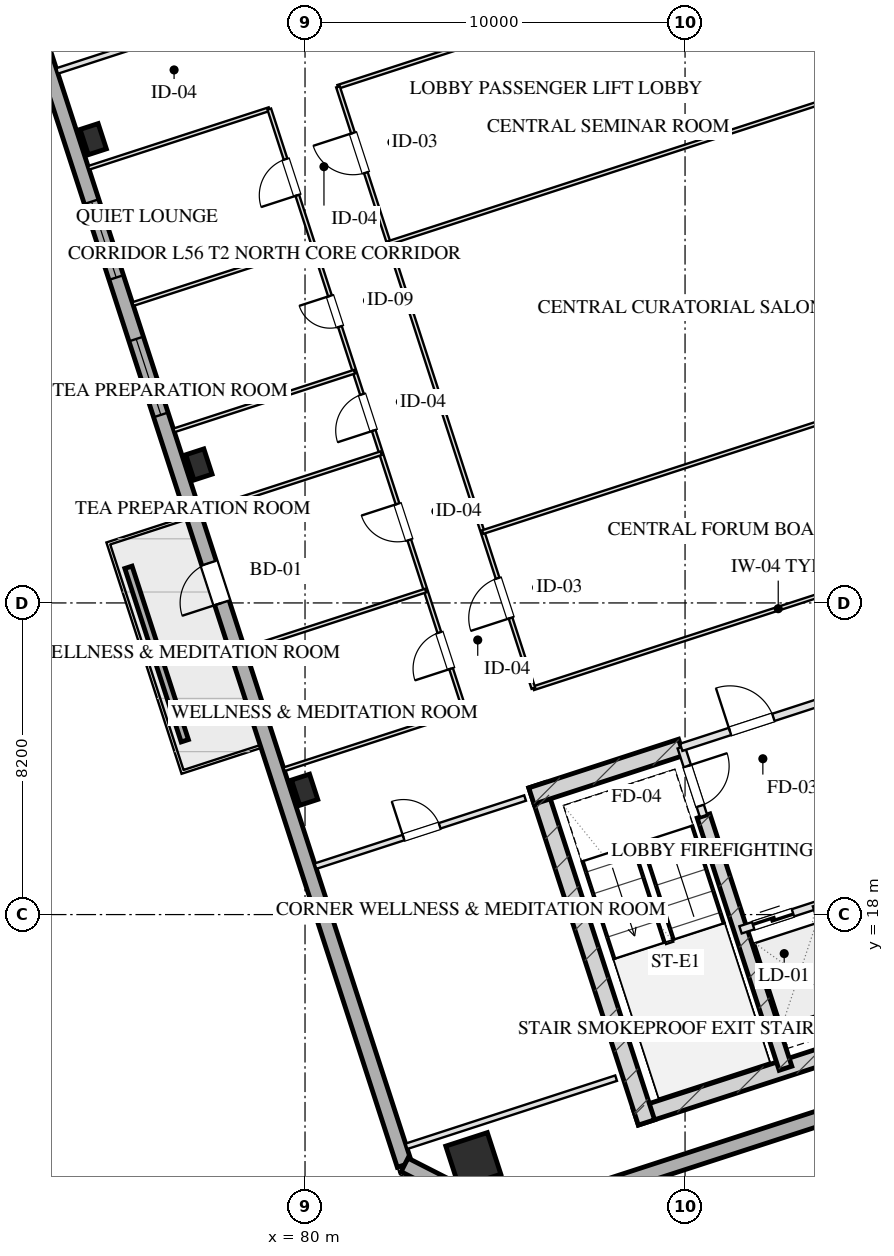
"""IFC4 building model, lengths in metres.
Left out: names, types, materials, properties, quantities, classifications, styles, units other than length and angle.
Written with IfcOpenShell. Run it as: python <this file> out.ifc"""

import sys

from ifc_helpers import new_model, si_unit, direction, frame, frame_2d, origin, origin_2d, place, context, subcontext, project, spatial, rectangle, hollow_rectangle, extrude, element, fill, save


model = new_model("IFC4")
c1 = context("Model", 3, precision=1e-05, world=origin(), true_north=direction((0.0, 1.0)))
c2 = subcontext(c1, "Body", "Model", "MODEL_VIEW")
j1 = project(units=[si_unit("LENGTHUNIT", "METRE"), si_unit("PLANEANGLEUNIT", "RADIAN")], contexts=[c1])
p1 = place(None, origin())
s1 = spatial("IfcSite", under=j1, at=p1, CompositionType="ELEMENT")
p2 = place(p1, origin())
s2 = spatial("IfcBuilding", under=s1, at=p2, CompositionType="ELEMENT")
p3 = place(p2, frame((0.0, 0.0, 209.3)))
s3 = spatial("IfcBuildingStorey", under=s2, at=p3, CompositionType="ELEMENT", Elevation=209.3)
p4 = place(p3, frame((88.701, 12.675, 0.0), z_axis=(0.0, 0.0, 1.0), x_axis=(0.95105824505, 0.309011673763, 0.0)))
e1 = element("IfcWall", 1, at=p4, inside=s3, PredefinedType="SHEAR", context=c2, shape_type="SweptSolid", body=[
    extrude(rectangle(XDim=16.25, YDim=0.45, at=frame_2d((8.125, 0.0))), origin(), (0.0, 0.0, 1.0), 3.45),
])
p5 = place(p3, frame((86.102, 21.404, 0.0), z_axis=(0.0, 0.0, 1.0), x_axis=(0.309035778627, -0.951050412717, 0.0)))
e2 = element("IfcWall", 2, at=p5, inside=s3, PredefinedType="SHEAR", context=c2, shape_type="SweptSolid", body=[
    extrude(rectangle(XDim=9.33, YDim=0.45, at=frame_2d((4.665, 0.0))), origin(), (0.0, 0.0, 1.0), 3.45),
])
p6 = place(p3, frame((90.486, 20.594, 0.0), z_axis=(0.0, 0.0, 1.0), x_axis=(0.309020428229, -0.951055400562, 0.0)))
e3 = element("IfcWall", 3, at=p6, inside=s3, PredefinedType="SHEAR", context=c2, shape_type="SweptSolid", body=[
    extrude(rectangle(XDim=6.98, YDim=0.35, at=frame_2d((3.49, 0.0))), origin(), (0.0, 0.0, 1.0), 3.45),
])
p7 = place(p3, frame((85.957, 21.12, 0.0), z_axis=(0.0, 0.0, 1.0), x_axis=(0.951064796122, 0.308991510526, 0.0)))
e4 = element("IfcWall", 4, at=p7, inside=s3, PredefinedType="SHEAR", context=c2, shape_type="SweptSolid", body=[
    extrude(rectangle(XDim=4.145, YDim=0.45, at=frame_2d((2.073, 0.0))), origin(), (0.0, 0.0, 1.0), 3.45),
])
p8 = place(p3, frame((84.428, 11.539, 0.0), z_axis=(0.0, 0.0, 1.0), x_axis=(0.951056516295, 0.309016994375, 0.0)))
e5 = element("IfcColumn", 5, at=p8, inside=s3, PredefinedType="COLUMN", context=c2, shape_type="SweptSolid", body=[
    extrude(hollow_rectangle(XDim=1.15, YDim=1.15, WallThickness=0.04, at=origin_2d()), origin(), (0.0, 0.0, 1.0), 3.451),
])
for number, where, z_axis, x_axis in (
    (6, (79.99, 21.284, 0.0), (0.0, 0.0, 1.0), (0.951, 0.309, 0.0)),
    (7, (77.208, 29.844, 0.0), (0.0, 0.0, 1.0), (0.951, 0.309, 0.0)),
    (8, (74.427, 38.403, 0.0), (0.0, 0.0, 1.0), (0.951, 0.309, 0.0)),
):
    element("IfcColumn", number, at=place(p3, frame(where, z_axis=z_axis, x_axis=x_axis)), inside=s3, PredefinedType="COLUMN", context=c2, shape_type="SweptSolid", body=[
        extrude(hollow_rectangle(XDim=0.5, YDim=0.7, WallThickness=0.025, at=origin_2d()), origin(), (0.0, 0.0, 1.0), 3.451),
    ])
p9 = place(p3, frame((82.618, 11.414, 0.0), z_axis=(0.0, 0.0, 1.0), x_axis=(-0.309016491071, 0.951056679828, 0.0)))
e9 = element("IfcWall", 9, at=p9, inside=s3, PredefinedType="SOLIDWALL", context=c2, shape_type="SweptSolid", body=[
    extrude(rectangle(XDim=38.4, YDim=0.4, at=frame_2d((19.2, 0.0))), origin(), (0.0, 0.0, 1.0), 2.61),
])
p10 = place(p9, frame((20.75, 0.0, 0.75)))
e10 = element("IfcOpeningElement", 10, at=p10, cuts=e9, PredefinedType="OPENING", context=c2, shape_type="SweptSolid", body=[
    extrude(rectangle(XDim=2.1, YDim=1.46, at=frame_2d((1.05, 0.73))), frame((0.0, 0.21, 0.0), z_axis=(0.0, -1.0, 0.0), x_axis=(1.0, 0.0, 0.0)), (0.0, 0.0, 1.0), 0.42),
])
p11 = place(p9, frame((24.55, 0.0, 0.75)))
e11 = element("IfcOpeningElement", 11, at=p11, cuts=e9, PredefinedType="OPENING", context=c2, shape_type="SweptSolid", body=[
    extrude(rectangle(XDim=2.1, YDim=1.46, at=frame_2d((1.05, 0.73))), frame((0.0, 0.21, 0.0), z_axis=(0.0, -1.0, 0.0), x_axis=(1.0, 0.0, 0.0)), (0.0, 0.0, 1.0), 0.42),
])
p12 = place(p9, frame((15.55, 0.0, 0.0)))
e12 = element("IfcOpeningElement", 12, at=p12, cuts=e9, PredefinedType="OPENING", context=c2, shape_type="SweptSolid", body=[
    extrude(rectangle(XDim=1.1, YDim=2.15, at=frame_2d((0.55, 1.075))), frame((0.0, 0.21, 0.0), z_axis=(0.0, -1.0, 0.0), x_axis=(1.0, 0.0, 0.0)), (0.0, 0.0, 1.0), 0.42),
])
p13 = place(p3, frame((107.835, 17.294, 0.0), z_axis=(0.0, 0.0, 1.0), x_axis=(-0.951058012937, -0.309012388148, 0.0)))
e13 = element("IfcWall", 13, at=p13, inside=s3, PredefinedType="SOLIDWALL", context=c2, shape_type="SweptSolid", body=[
    extrude(rectangle(XDim=23.6, YDim=0.4, at=frame_2d((11.8, 0.0))), origin(), (0.0, 0.0, 1.0), 2.61),
])
p14 = place(p3, frame((85.39, 10.001, 0.0), z_axis=(0.0, 0.0, 1.0), x_axis=(-0.890979603174, 0.454043331334, 0.0)))
e14 = element("IfcWall", 14, at=p14, inside=s3, PredefinedType="SOLIDWALL", context=c2, shape_type="SweptSolid", body=[
    extrude(rectangle(XDim=3.111, YDim=0.4, at=frame_2d((1.556, 0.0))), origin(), (0.0, 0.0, 1.0), 2.61),
])
p15 = place(p3, frame((76.837, 22.573, 0.0), z_axis=(0.0, 0.0, 1.0), x_axis=(-0.309032019345, 0.951051634255, 0.0)))
e15 = element("IfcWall", 15, at=p15, inside=s3, PredefinedType="PARAPET", context=c2, shape_type="SweptSolid", body=[
    extrude(rectangle(XDim=4.8, YDim=0.2, at=frame_2d((2.4, 0.0))), origin(), (0.0, 0.0, 1.0), 0.75),
])
p16 = place(p3, frame((89.899, 22.401, 0.0), z_axis=(0.0, 0.0, 1.0), x_axis=(0.308932062672, -0.951084108086, 0.0)))
e16 = element("IfcWall", 16, at=p16, inside=s3, PredefinedType="PARTITIONING", context=c2, shape_type="SweptSolid", body=[
    extrude(rectangle(XDim=1.9, YDim=0.2, at=frame_2d((0.95, 0.0))), origin(), (0.0, 0.0, 1.0), 3.175),
])
p17 = place(p16, frame((0.52, 0.0, 0.0)))
e17 = element("IfcOpeningElement", 17, at=p17, cuts=e16, PredefinedType="OPENING", context=c2, shape_type="SweptSolid", body=[
    extrude(rectangle(XDim=1.1, YDim=2.05, at=frame_2d((0.55, 1.025))), frame((0.0, 0.11, 0.0), z_axis=(0.0, -1.0, 0.0), x_axis=(1.0, 0.0, 0.0)), (0.0, 0.0, 1.0), 0.22),
])
p18 = place(p3, frame((89.899, 22.401, 0.0), z_axis=(0.0, 0.0, 1.0), x_axis=(0.951046716504, 0.309047153403, 0.0)))
e18 = element("IfcWall", 18, at=p18, inside=s3, PredefinedType="PARTITIONING", context=c2, shape_type="SweptSolid", body=[
    extrude(rectangle(XDim=3.83, YDim=0.2, at=frame_2d((1.915, 0.0))), origin(), (0.0, 0.0, 1.0), 3.175),
])
p19 = place(p18, frame((1.35, 0.0, 0.0)))
e19 = element("IfcOpeningElement", 19, at=p19, cuts=e18, PredefinedType="OPENING", context=c2, shape_type="SweptSolid", body=[
    extrude(rectangle(XDim=1.2, YDim=2.05, at=frame_2d((0.6, 1.025))), frame((0.0, 0.11, 0.0), z_axis=(0.0, -1.0, 0.0), x_axis=(1.0, 0.0, 0.0)), (0.0, 0.0, 1.0), 0.22),
])
p20 = place(p3, frame((91.46, 17.598, 0.0), z_axis=(0.0, 0.0, 1.0), x_axis=(0.951062257173, 0.308999325213, 0.0)))
e20 = element("IfcWall", 20, at=p20, inside=s3, PredefinedType="PARTITIONING", context=c2, shape_type="SweptSolid", body=[
    extrude(rectangle(XDim=2.1, YDim=0.2, at=frame_2d((1.05, 0.0))), origin(), (0.0, 0.0, 1.0), 3.175),
])
p21 = place(p20, frame((0.35, 0.0, 0.0)))
e21 = element("IfcOpeningElement", 21, at=p21, cuts=e20, PredefinedType="OPENING", context=c2, shape_type="SweptSolid", body=[
    extrude(rectangle(XDim=1.1, YDim=2.05, at=frame_2d((0.55, 1.025))), frame((0.0, 0.11, 0.0), z_axis=(0.0, -1.0, 0.0), x_axis=(1.0, 0.0, 0.0)), (0.0, 0.0, 1.0), 0.22),
])
p22 = place(p3, frame((93.457, 18.247, 0.0), z_axis=(0.0, 0.0, 1.0), x_axis=(0.3089935693, -0.951064127245, 0.0)))
e22 = element("IfcWall", 22, at=p22, inside=s3, PredefinedType="PARTITIONING", context=c2, shape_type="SweptSolid", body=[
    extrude(rectangle(XDim=3.7, YDim=0.2, at=frame_2d((1.85, 0.0))), origin(), (0.0, 0.0, 1.0), 3.175),
])
p23 = place(p3, frame((82.669, 11.903, 0.0), z_axis=(0.0, 0.0, 1.0), x_axis=(0.951059431056, 0.309008023519, 0.0)))
e23 = element("IfcWall", 23, at=p23, inside=s3, PredefinedType="PARTITIONING", context=c2, shape_type="SweptSolid", body=[
    extrude(rectangle(XDim=5.8, YDim=0.15, at=frame_2d((2.9, 0.0))), origin(), (0.0, 0.0, 1.0), 3.175),
])
p24 = place(p3, frame((80.275, 19.274, 0.0), z_axis=(0.0, 0.0, 1.0), x_axis=(0.951059431056, 0.309008023519, 0.0)))
e24 = element("IfcWall", 24, at=p24, inside=s3, PredefinedType="PARTITIONING", context=c2, shape_type="SweptSolid", body=[
    extrude(rectangle(XDim=5.8, YDim=0.15, at=frame_2d((2.9, 0.0))), origin(), (0.0, 0.0, 1.0), 3.175),
])
p25 = place(p24, frame((2.436, 0.0, 0.0)))
e25 = element("IfcOpeningElement", 25, at=p25, cuts=e24, PredefinedType="OPENING", context=c2, shape_type="SweptSolid", body=[
    extrude(rectangle(XDim=1.0, YDim=2.05, at=frame_2d((0.5, 1.025))), frame((0.0, 0.085, 0.0), z_axis=(0.0, -1.0, 0.0), x_axis=(1.0, 0.0, 0.0)), (0.0, 0.0, 1.0), 0.17),
])
p26 = place(p3, frame((73.476, 40.197, 0.0), z_axis=(0.0, 0.0, 1.0), x_axis=(0.951059431056, 0.309008023519, 0.0)))
e26 = element("IfcWall", 26, at=p26, inside=s3, PredefinedType="PARTITIONING", context=c2, shape_type="SweptSolid", body=[
    extrude(rectangle(XDim=5.8, YDim=0.15, at=frame_2d((2.9, 0.0))), origin(), (0.0, 0.0, 1.0), 3.175),
])
p27 = place(p26, frame((2.436, 0.0, 0.0)))
e27 = element("IfcOpeningElement", 27, at=p27, cuts=e26, PredefinedType="OPENING", context=c2, shape_type="SweptSolid", body=[
    extrude(rectangle(XDim=1.0, YDim=2.05, at=frame_2d((0.5, 1.025))), frame((0.0, 0.085, 0.0), z_axis=(0.0, -1.0, 0.0), x_axis=(1.0, 0.0, 0.0)), (0.0, 0.0, 1.0), 0.17),
])
p28 = place(p3, frame((79.447, 21.823, 0.0), z_axis=(0.0, 0.0, 1.0), x_axis=(0.951048779938, 0.309040803421, 0.0)))
e28 = element("IfcWall", 28, at=p28, inside=s3, PredefinedType="MOVABLE", context=c2, shape_type="SweptSolid", body=[
    extrude(rectangle(XDim=5.0, YDim=0.1, at=frame_2d((2.5, 0.0))), origin(), (0.0, 0.0, 1.0), 3.175),
])
p29 = place(p3, frame((86.009, 23.955, 0.0), z_axis=(0.0, 0.0, 1.0), x_axis=(0.951059488241, 0.309007847517, 0.0)))
e29 = element("IfcWall", 29, at=p29, inside=s3, PredefinedType="MOVABLE", context=c2, shape_type="SweptSolid", body=[
    extrude(rectangle(XDim=13.55, YDim=0.1, at=frame_2d((6.775, 0.0))), origin(), (0.0, 0.0, 1.0), 3.175),
])
p30 = place(p3, frame((74.304, 37.648, 0.0), z_axis=(0.0, 0.0, 1.0), x_axis=(0.951063130697, 0.308996636599, 0.0)))
e30 = element("IfcWall", 30, at=p30, inside=s3, PredefinedType="MOVABLE", context=c2, shape_type="SweptSolid", body=[
    extrude(rectangle(XDim=5.0, YDim=0.1, at=frame_2d((2.5, 0.0))), origin(), (0.0, 0.0, 1.0), 3.175),
])
p31 = place(p3, frame((80.867, 39.781, 0.0), z_axis=(0.0, 0.0, 1.0), x_axis=(0.951054192928, 0.309024144872, 0.0)))
e31 = element("IfcWall", 31, at=p31, inside=s3, PredefinedType="MOVABLE", context=c2, shape_type="SweptSolid", body=[
    extrude(rectangle(XDim=13.55, YDim=0.1, at=frame_2d((6.775, 0.0))), origin(), (0.0, 0.0, 1.0), 3.175),
])
p32 = place(p3, frame((84.202, 23.368, 0.0), z_axis=(0.0, 0.0, 1.0), x_axis=(-0.309022042254, 0.951054876125, 0.0)))
e32 = element("IfcWall", 32, at=p32, inside=s3, PredefinedType="MOVABLE", context=c2, shape_type="SweptSolid", body=[
    extrude(rectangle(XDim=16.64, YDim=0.1, at=frame_2d((8.32, 0.0))), origin(), (0.0, 0.0, 1.0), 3.175),
])
p33 = place(p32, frame((1.16, 0.0, 0.0)))
e33 = element("IfcOpeningElement", 33, at=p33, cuts=e32, PredefinedType="OPENING", context=c2, shape_type="SweptSolid", body=[
    extrude(rectangle(XDim=1.0, YDim=2.05, at=frame_2d((0.5, 1.025))), frame((0.0, 0.06, 0.0), z_axis=(0.0, -1.0, 0.0), x_axis=(1.0, 0.0, 0.0)), (0.0, 0.0, 1.0), 0.12),
])
p34 = place(p32, frame((4.72, 0.0, 0.0)))
e34 = element("IfcOpeningElement", 34, at=p34, cuts=e32, PredefinedType="OPENING", context=c2, shape_type="SweptSolid", body=[
    extrude(rectangle(XDim=1.0, YDim=2.05, at=frame_2d((0.5, 1.025))), frame((0.0, 0.06, 0.0), z_axis=(0.0, -1.0, 0.0), x_axis=(1.0, 0.0, 0.0)), (0.0, 0.0, 1.0), 0.12),
])
p35 = place(p32, frame((7.748, 0.0, 0.0)))
e35 = element("IfcOpeningElement", 35, at=p35, cuts=e32, PredefinedType="OPENING", context=c2, shape_type="SweptSolid", body=[
    extrude(rectangle(XDim=1.0, YDim=2.05, at=frame_2d((0.5, 1.025))), frame((0.0, 0.06, 0.0), z_axis=(0.0, -1.0, 0.0), x_axis=(1.0, 0.0, 0.0)), (0.0, 0.0, 1.0), 0.12),
])
p36 = place(p32, frame((10.623, 0.0, 0.0)))
e36 = element("IfcOpeningElement", 36, at=p36, cuts=e32, PredefinedType="OPENING", context=c2, shape_type="SweptSolid", body=[
    extrude(rectangle(XDim=0.85, YDim=2.05, at=frame_2d((0.425, 1.025))), frame((0.0, 0.06, 0.0), z_axis=(0.0, -1.0, 0.0), x_axis=(1.0, 0.0, 0.0)), (0.0, 0.0, 1.0), 0.12),
])
p37 = place(p32, frame((14.255, 0.0, 0.0)))
e37 = element("IfcOpeningElement", 37, at=p37, cuts=e32, PredefinedType="OPENING", context=c2, shape_type="SweptSolid", body=[
    extrude(rectangle(XDim=1.0, YDim=2.05, at=frame_2d((0.5, 1.025))), frame((0.0, 0.06, 0.0), z_axis=(0.0, -1.0, 0.0), x_axis=(1.0, 0.0, 0.0)), (0.0, 0.0, 1.0), 0.12),
])
p38 = place(p3, frame((86.009, 23.955, 0.0), z_axis=(0.0, 0.0, 1.0), x_axis=(-0.309022042254, 0.951054876125, 0.0)))
e38 = element("IfcWall", 38, at=p38, inside=s3, PredefinedType="MOVABLE", context=c2, shape_type="SweptSolid", body=[
    extrude(rectangle(XDim=16.64, YDim=0.1, at=frame_2d((8.32, 0.0))), origin(), (0.0, 0.0, 1.0), 3.175),
])
p39 = place(p38, frame((1.944, 0.0, 0.0)))
e39 = element("IfcOpeningElement", 39, at=p39, cuts=e38, PredefinedType="OPENING", context=c2, shape_type="SweptSolid", body=[
    extrude(rectangle(XDim=1.1, YDim=2.05, at=frame_2d((0.55, 1.025))), frame((0.0, 0.06, 0.0), z_axis=(0.0, -1.0, 0.0), x_axis=(1.0, 0.0, 0.0)), (0.0, 0.0, 1.0), 0.12),
])
p40 = place(p38, frame((14.264, 0.0, 0.0)))
e40 = element("IfcOpeningElement", 40, at=p40, cuts=e38, PredefinedType="OPENING", context=c2, shape_type="SweptSolid", body=[
    extrude(rectangle(XDim=1.1, YDim=2.05, at=frame_2d((0.55, 1.025))), frame((0.0, 0.06, 0.0), z_axis=(0.0, -1.0, 0.0), x_axis=(1.0, 0.0, 0.0)), (0.0, 0.0, 1.0), 0.12),
])
p41 = place(p3, frame((84.674, 28.063, 0.0), z_axis=(0.0, 0.0, 1.0), x_axis=(0.951054192928, 0.309024144872, 0.0)))
e41 = element("IfcWall", 41, at=p41, inside=s3, PredefinedType="MOVABLE", context=c2, shape_type="SweptSolid", body=[
    extrude(rectangle(XDim=13.55, YDim=0.1, at=frame_2d((6.775, 0.0))), origin(), (0.0, 0.0, 1.0), 3.175),
])
p42 = place(p3, frame((82.202, 35.672, 0.0), z_axis=(0.0, 0.0, 1.0), x_axis=(0.951059488241, 0.309007847517, 0.0)))
e42 = element("IfcWall", 42, at=p42, inside=s3, PredefinedType="MOVABLE", context=c2, shape_type="SweptSolid", body=[
    extrude(rectangle(XDim=13.55, YDim=0.1, at=frame_2d((6.775, 0.0))), origin(), (0.0, 0.0, 1.0), 3.175),
])
p43 = place(p3, frame((78.42, 24.98, 0.0), z_axis=(0.0, 0.0, 1.0), x_axis=(0.951053443117, 0.309026452484, 0.0)))
e43 = element("IfcWall", 43, at=p43, inside=s3, PredefinedType="MOVABLE", context=c2, shape_type="SweptSolid", body=[
    extrude(rectangle(XDim=5.0, YDim=0.1, at=frame_2d((2.5, 0.0))), origin(), (0.0, 0.0, 1.0), 3.175),
])
for number, where, z_axis, x_axis in (
    (44, (77.246, 28.594, 0.0), (0.0, 0.0, 1.0), (0.951, 0.309, 0.0)),
    (45, (76.549, 30.74, 0.0), (0.0, 0.0, 1.0), (0.951, 0.309, 0.0)),
):
    element("IfcWall", number, at=place(p3, frame(where, z_axis=z_axis, x_axis=x_axis)), inside=s3, PredefinedType="MOVABLE", context=c2, shape_type="SweptSolid", body=[
        extrude(rectangle(XDim=5.0, YDim=0.1, at=frame_2d((2.5, 0.0))), origin(), (0.0, 0.0, 1.0), 3.175),
    ])
p44 = place(p3, frame((75.469, 34.063, 0.0), z_axis=(0.0, 0.0, 1.0), x_axis=(0.951053443117, 0.309026452484, 0.0)))
e46 = element("IfcWall", 46, at=p44, inside=s3, PredefinedType="MOVABLE", context=c2, shape_type="SweptSolid", body=[
    extrude(rectangle(XDim=5.0, YDim=0.1, at=frame_2d((2.5, 0.0))), origin(), (0.0, 0.0, 1.0), 3.175),
])
p45 = place(p10, origin())
e47 = element("IfcWindow", 47, at=p45, inside=s3, PartitioningType="TRIPLE_PANEL_VERTICAL", PredefinedType="WINDOW", context=c2, shape_type="SweptSolid", body=[
    extrude(rectangle(XDim=2.1, YDim=1.46, at=frame_2d((1.05, 0.73))), frame((0.0, 0.03, 0.0), z_axis=(0.0, -1.0, 0.0), x_axis=(1.0, 0.0, 0.0)), (0.0, 0.0, 1.0), 0.06),
])
fill(e10, e47)
p46 = place(p11, origin())
e48 = element("IfcWindow", 48, at=p46, inside=s3, PartitioningType="TRIPLE_PANEL_VERTICAL", PredefinedType="WINDOW", context=c2, shape_type="SweptSolid", body=[
    extrude(rectangle(XDim=2.1, YDim=1.46, at=frame_2d((1.05, 0.73))), frame((0.0, 0.03, 0.0), z_axis=(0.0, -1.0, 0.0), x_axis=(1.0, 0.0, 0.0)), (0.0, 0.0, 1.0), 0.06),
])
fill(e11, e48)
p47 = place(p12, origin())
e49 = element("IfcDoor", 49, at=p47, inside=s3, OperationType="SINGLE_SWING_LEFT", PredefinedType="DOOR", context=c2, shape_type="SweptSolid", body=[
    extrude(rectangle(XDim=1.1, YDim=2.15, at=frame_2d((0.55, 1.075))), frame((0.0, 0.025, 0.0), z_axis=(0.0, -1.0, 0.0), x_axis=(1.0, 0.0, 0.0)), (0.0, 0.0, 1.0), 0.05),
])
fill(e12, e49)
p48 = place(p17, origin())
e50 = element("IfcDoor", 50, at=p48, inside=s3, OperationType="SINGLE_SWING_LEFT", PredefinedType="DOOR", context=c2, shape_type="SweptSolid", body=[
    extrude(rectangle(XDim=1.1, YDim=2.05, at=frame_2d((0.55, 1.025))), frame((0.0, 0.025, 0.0), z_axis=(0.0, -1.0, 0.0), x_axis=(1.0, 0.0, 0.0)), (0.0, 0.0, 1.0), 0.05),
])
fill(e17, e50)
p49 = place(p19, origin())
e51 = element("IfcDoor", 51, at=p49, inside=s3, OperationType="SINGLE_SWING_LEFT", PredefinedType="DOOR", context=c2, shape_type="SweptSolid", body=[
    extrude(rectangle(XDim=1.2, YDim=2.05, at=frame_2d((0.6, 1.025))), frame((0.0, 0.025, 0.0), z_axis=(0.0, -1.0, 0.0), x_axis=(1.0, 0.0, 0.0)), (0.0, 0.0, 1.0), 0.05),
])
fill(e19, e51)
p50 = place(p21, origin())
e52 = element("IfcDoor", 52, at=p50, inside=s3, OperationType="DOUBLE_DOOR_SLIDING", PredefinedType="DOOR", context=c2, shape_type="SweptSolid", body=[
    extrude(rectangle(XDim=1.1, YDim=2.05, at=frame_2d((0.55, 1.025))), frame((0.0, 0.025, 0.0), z_axis=(0.0, -1.0, 0.0), x_axis=(1.0, 0.0, 0.0)), (0.0, 0.0, 1.0), 0.05),
])
fill(e21, e52)
p51 = place(p25, origin())
e53 = element("IfcDoor", 53, at=p51, inside=s3, OperationType="SINGLE_SWING_LEFT", PredefinedType="DOOR", context=c2, shape_type="SweptSolid", body=[
    extrude(rectangle(XDim=1.0, YDim=2.05, at=frame_2d((0.5, 1.025))), frame((0.0, 0.025, 0.0), z_axis=(0.0, -1.0, 0.0), x_axis=(1.0, 0.0, 0.0)), (0.0, 0.0, 1.0), 0.05),
])
fill(e25, e53)
p52 = place(p33, origin())
e54 = element("IfcDoor", 54, at=p52, inside=s3, OperationType="SINGLE_SWING_LEFT", PredefinedType="DOOR", context=c2, shape_type="SweptSolid", body=[
    extrude(rectangle(XDim=1.0, YDim=2.05, at=frame_2d((0.5, 1.025))), frame((0.0, 0.025, 0.0), z_axis=(0.0, -1.0, 0.0), x_axis=(1.0, 0.0, 0.0)), (0.0, 0.0, 1.0), 0.05),
])
fill(e33, e54)
p53 = place(p34, origin())
e55 = element("IfcDoor", 55, at=p53, inside=s3, OperationType="SINGLE_SWING_RIGHT", PredefinedType="DOOR", context=c2, shape_type="SweptSolid", body=[
    extrude(rectangle(XDim=1.0, YDim=2.05, at=frame_2d((0.5, 1.025))), frame((0.0, 0.025, 0.0), z_axis=(0.0, -1.0, 0.0), x_axis=(1.0, 0.0, 0.0)), (0.0, 0.0, 1.0), 0.05),
])
fill(e34, e55)
p54 = place(p35, origin())
e56 = element("IfcDoor", 56, at=p54, inside=s3, OperationType="SINGLE_SWING_LEFT", PredefinedType="DOOR", context=c2, shape_type="SweptSolid", body=[
    extrude(rectangle(XDim=1.0, YDim=2.05, at=frame_2d((0.5, 1.025))), frame((0.0, 0.025, 0.0), z_axis=(0.0, -1.0, 0.0), x_axis=(1.0, 0.0, 0.0)), (0.0, 0.0, 1.0), 0.05),
])
fill(e35, e56)
p55 = place(p36, origin())
e57 = element("IfcDoor", 57, at=p55, inside=s3, OperationType="SINGLE_SWING_RIGHT", PredefinedType="DOOR", context=c2, shape_type="SweptSolid", body=[
    extrude(rectangle(XDim=0.85, YDim=2.05, at=frame_2d((0.425, 1.025))), frame((0.0, 0.025, 0.0), z_axis=(0.0, -1.0, 0.0), x_axis=(1.0, 0.0, 0.0)), (0.0, 0.0, 1.0), 0.05),
])
fill(e36, e57)
p56 = place(p37, origin())
e58 = element("IfcDoor", 58, at=p56, inside=s3, OperationType="SINGLE_SWING_LEFT", PredefinedType="DOOR", context=c2, shape_type="SweptSolid", body=[
    extrude(rectangle(XDim=1.0, YDim=2.05, at=frame_2d((0.5, 1.025))), frame((0.0, 0.025, 0.0), z_axis=(0.0, -1.0, 0.0), x_axis=(1.0, 0.0, 0.0)), (0.0, 0.0, 1.0), 0.05),
])
fill(e37, e58)
p57 = place(p39, origin())
e59 = element("IfcDoor", 59, at=p57, inside=s3, OperationType="SINGLE_SWING_LEFT", PredefinedType="DOOR", context=c2, shape_type="SweptSolid", body=[
    extrude(rectangle(XDim=1.1, YDim=2.05, at=frame_2d((0.55, 1.025))), frame((0.0, 0.025, 0.0), z_axis=(0.0, -1.0, 0.0), x_axis=(1.0, 0.0, 0.0)), (0.0, 0.0, 1.0), 0.05),
])
fill(e39, e59)
p58 = place(p40, origin())
e60 = element("IfcDoor", 60, at=p58, inside=s3, OperationType="SINGLE_SWING_RIGHT", PredefinedType="DOOR", context=c2, shape_type="SweptSolid", body=[
    extrude(rectangle(XDim=1.1, YDim=2.05, at=frame_2d((0.55, 1.025))), frame((0.0, 0.025, 0.0), z_axis=(0.0, -1.0, 0.0), x_axis=(1.0, 0.0, 0.0)), (0.0, 0.0, 1.0), 0.05),
])
fill(e40, e60)
save(model, sys.argv[1])
